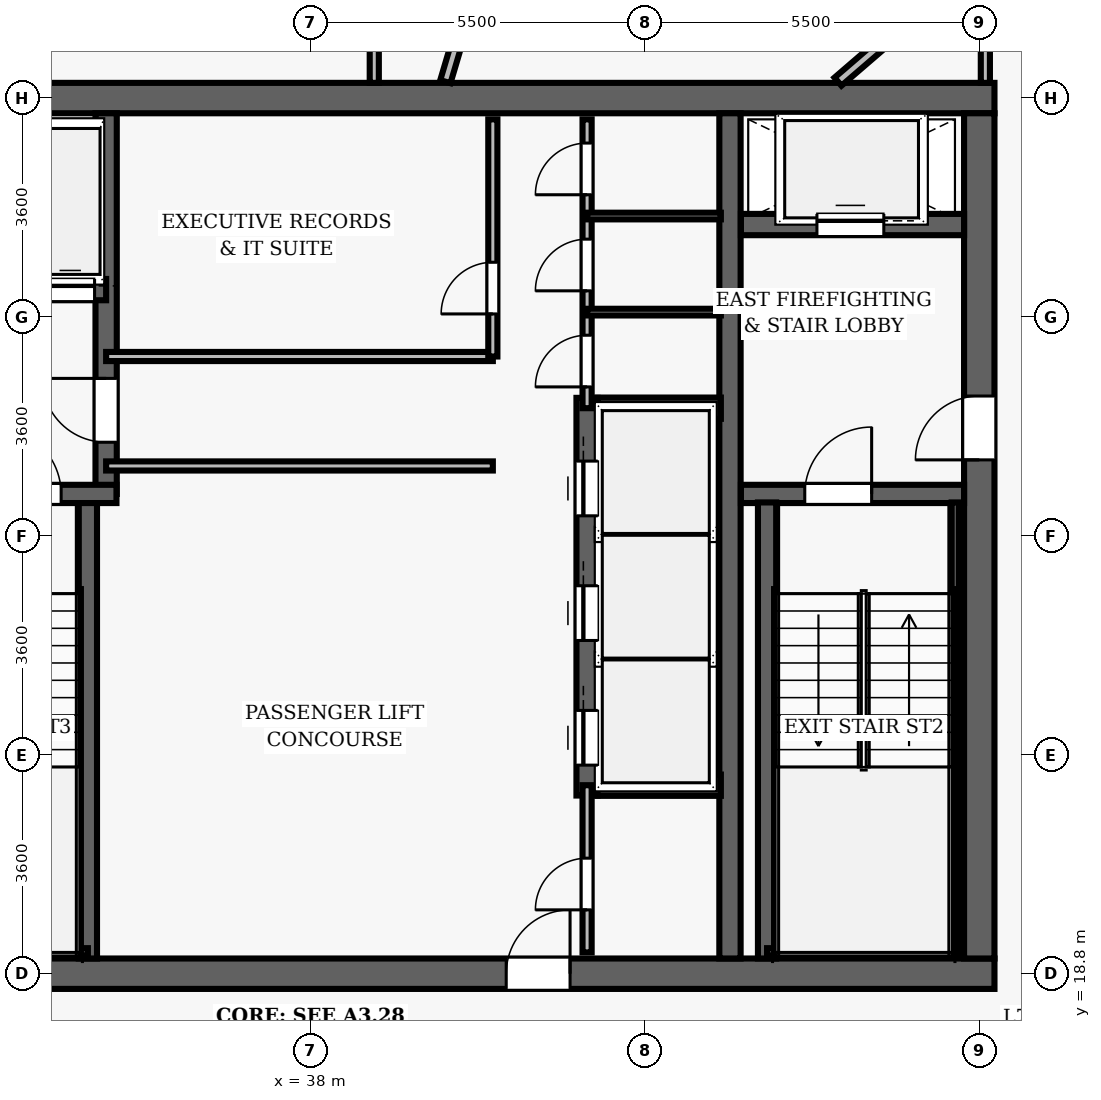
"""IFC4 building model, lengths in metres.
Left out: names, types, materials, properties, quantities, classifications, styles, units other than length and angle.
Written with IfcOpenShell. Run it as: python <this file> out.ifc"""

import sys

from ifc_helpers import new_model, si_unit, direction, frame, frame_2d, origin, place, context, subcontext, project, spatial, rectangle, extrude, element, fill, save


model = new_model("IFC4")
c1 = context("Model", 3, precision=1e-05, world=origin(), true_north=direction((0.0, 1.0)))
c2 = subcontext(c1, "Body", "Model", "MODEL_VIEW")
j1 = project(units=[si_unit("LENGTHUNIT", "METRE"), si_unit("PLANEANGLEUNIT", "RADIAN")], contexts=[c1])
p1 = place(None, origin())
s1 = spatial("IfcSite", under=j1, at=p1, CompositionType="ELEMENT")
p2 = place(p1, origin())
s2 = spatial("IfcBuilding", under=s1, at=p2, CompositionType="ELEMENT")
p3 = place(p2, frame((0.0, 0.0, 276.7)))
s3 = spatial("IfcBuildingStorey", under=s2, at=p3, CompositionType="ELEMENT", Elevation=276.7)
p4 = place(p3, frame((26.75, 18.8, 0.0), z_axis=(0.0, 0.0, 1.0), x_axis=(1.0, 0.0, 0.0)))
e1 = element("IfcWall", 1, at=p4, inside=s3, PredefinedType="SHEAR", context=c2, shape_type="SweptSolid", body=[
    extrude(rectangle(XDim=22.5, YDim=0.5, at=frame_2d((11.25, 0.0))), origin(), (0.0, 0.0, 1.0), 3.85),
])
p5 = place(p4, frame((14.47, 0.0, 0.0)))
e2 = element("IfcOpeningElement", 2, at=p5, cuts=e1, PredefinedType="OPENING", context=c2, shape_type="SweptSolid", body=[
    extrude(rectangle(XDim=1.05, YDim=2.15, at=frame_2d((0.525, 1.075))), frame((0.0, 0.26, 0.0), z_axis=(0.0, -1.0, 0.0), x_axis=(1.0, 0.0, 0.0)), (0.0, 0.0, 1.0), 0.52),
])
p6 = place(p3, frame((26.75, 33.2, 0.0), z_axis=(0.0, 0.0, 1.0), x_axis=(1.0, 0.0, 0.0)))
e3 = element("IfcWall", 3, at=p6, inside=s3, PredefinedType="SHEAR", context=c2, shape_type="SweptSolid", body=[
    extrude(rectangle(XDim=22.5, YDim=0.5, at=frame_2d((11.25, 0.0))), origin(), (0.0, 0.0, 1.0), 3.85),
])
p7 = place(p3, frame((49.0, 19.05, 0.0), z_axis=(0.0, 0.0, 1.0), x_axis=(0.0, 1.0, 0.0)))
e4 = element("IfcWall", 4, at=p7, inside=s3, PredefinedType="SHEAR", context=c2, shape_type="SweptSolid", body=[
    extrude(rectangle(XDim=13.9, YDim=0.5, at=frame_2d((6.95, 0.0))), origin(), (0.0, 0.0, 1.0), 3.85),
])
p8 = place(p7, frame((8.2, 0.0, 0.0)))
e5 = element("IfcOpeningElement", 5, at=p8, cuts=e4, PredefinedType="OPENING", context=c2, shape_type="SweptSolid", body=[
    extrude(rectangle(XDim=1.05, YDim=2.15, at=frame_2d((0.525, 1.075))), frame((0.0, 0.26, 0.0), z_axis=(0.0, -1.0, 0.0), x_axis=(1.0, 0.0, 0.0)), (0.0, 0.0, 1.0), 0.52),
])
p9 = place(p3, frame((44.9, 19.05, 0.0), z_axis=(0.0, 0.0, 1.0), x_axis=(0.0, 1.0, 0.0)))
e6 = element("IfcWall", 6, at=p9, inside=s3, PredefinedType="SHEAR", context=c2, shape_type="SweptSolid", body=[
    extrude(rectangle(XDim=13.9, YDim=0.35, at=frame_2d((6.95, 0.0))), origin(), (0.0, 0.0, 1.0), 3.85),
])
p10 = place(p3, frame((45.08, 26.69, 0.0), z_axis=(0.0, 0.0, 1.0), x_axis=(1.0, 0.0, 0.0)))
e7 = element("IfcWall", 7, at=p10, inside=s3, PredefinedType="SHEAR", context=c2, shape_type="SweptSolid", body=[
    extrude(rectangle(XDim=3.67, YDim=0.3, at=frame_2d((1.835, 0.0))), origin(), (0.0, 0.0, 1.0), 3.85),
])
p11 = place(p10, frame((1.05, 0.0, 0.0)))
e8 = element("IfcOpeningElement", 8, at=p11, cuts=e7, PredefinedType="OPENING", context=c2, shape_type="SweptSolid", body=[
    extrude(rectangle(XDim=1.1, YDim=2.15, at=frame_2d((0.55, 1.075))), frame((0.0, 0.16, 0.0), z_axis=(0.0, -1.0, 0.0), x_axis=(1.0, 0.0, 0.0)), (0.0, 0.0, 1.0), 0.32),
])
p12 = place(p3, frame((45.51, 19.05, 0.0), z_axis=(0.0, 0.0, 1.0), x_axis=(0.0, 1.0, 0.0)))
e9 = element("IfcWall", 9, at=p12, inside=s3, PredefinedType="SHEAR", context=c2, shape_type="SweptSolid", body=[
    extrude(rectangle(XDim=7.5, YDim=0.3, at=frame_2d((3.75, 0.0))), origin(), (0.0, 0.0, 1.0), 3.85),
])
p13 = place(p3, frame((48.605, 19.1, 0.0), z_axis=(0.0, 0.0, 1.0), x_axis=(0.0, 1.0, 0.0)))
e10 = element("IfcWall", 10, at=p13, inside=s3, PredefinedType="SHEAR", context=c2, shape_type="SweptSolid", body=[
    extrude(rectangle(XDim=7.45, YDim=0.12, at=frame_2d((3.725, 0.0))), origin(), (0.0, 0.0, 1.0), 3.85),
])
p14 = place(p3, frame((45.51, 19.16, 0.0), z_axis=(0.0, 0.0, 1.0), x_axis=(1.0, 0.0, 0.0)))
e11 = element("IfcWall", 11, at=p14, inside=s3, PredefinedType="SHEAR", context=c2, shape_type="SweptSolid", body=[
    extrude(rectangle(XDim=3.095, YDim=0.12, at=frame_2d((1.547, 0.0))), origin(), (0.0, 0.0, 1.0), 3.85),
])
p15 = place(p3, frame((45.08, 31.12, 0.0), z_axis=(0.0, 0.0, 1.0), x_axis=(1.0, 0.0, 0.0)))
e12 = element("IfcWall", 12, at=p15, inside=s3, PredefinedType="SHEAR", context=c2, shape_type="SweptSolid", body=[
    extrude(rectangle(XDim=3.67, YDim=0.35, at=frame_2d((1.835, 0.0))), origin(), (0.0, 0.0, 1.0), 3.04),
])
p16 = place(p15, frame((1.25, 0.0, 0.0)))
e13 = element("IfcOpeningElement", 13, at=p16, cuts=e12, PredefinedType="OPENING", context=c2, shape_type="SweptSolid", body=[
    extrude(rectangle(XDim=1.1, YDim=2.15, at=frame_2d((0.55, 1.075))), frame((0.0, 0.185, 0.0), z_axis=(0.0, -1.0, 0.0), x_axis=(1.0, 0.0, 0.0)), (0.0, 0.0, 1.0), 0.37),
])
p17 = place(p3, frame((34.34, 19.05, 0.0), z_axis=(0.0, 0.0, 1.0), x_axis=(0.0, 1.0, 0.0)))
e14 = element("IfcWall", 14, at=p17, inside=s3, PredefinedType="SHEAR", context=c2, shape_type="SweptSolid", body=[
    extrude(rectangle(XDim=7.5, YDim=0.3, at=frame_2d((3.75, 0.0))), origin(), (0.0, 0.0, 1.0), 3.85),
])
p18 = place(p3, frame((34.64, 26.69, 0.0), z_axis=(0.0, 0.0, 1.0), x_axis=(0.0, 1.0, 0.0)))
e15 = element("IfcWall", 15, at=p18, inside=s3, PredefinedType="SHEAR", context=c2, shape_type="SweptSolid", body=[
    extrude(rectangle(XDim=6.26, YDim=0.35, at=frame_2d((3.13, 0.0))), origin(), (0.0, 0.0, 1.0), 3.85),
])
p19 = place(p18, frame((0.85, 0.0, 0.0)))
e16 = element("IfcOpeningElement", 16, at=p19, cuts=e15, PredefinedType="OPENING", context=c2, shape_type="SweptSolid", body=[
    extrude(rectangle(XDim=1.05, YDim=2.15, at=frame_2d((0.525, 1.075))), frame((0.0, 0.185, 0.0), z_axis=(0.0, -1.0, 0.0), x_axis=(1.0, 0.0, 0.0)), (0.0, 0.0, 1.0), 0.37),
])
p20 = place(p3, frame((31.25, 26.69, 0.0), z_axis=(0.0, 0.0, 1.0), x_axis=(1.0, 0.0, 0.0)))
e17 = element("IfcWall", 17, at=p20, inside=s3, PredefinedType="SHEAR", context=c2, shape_type="SweptSolid", body=[
    extrude(rectangle(XDim=3.56, YDim=0.3, at=frame_2d((1.78, 0.0))), origin(), (0.0, 0.0, 1.0), 3.85),
])
p21 = place(p20, frame((1.55, 0.0, 0.0)))
e18 = element("IfcOpeningElement", 18, at=p21, cuts=e17, PredefinedType="OPENING", context=c2, shape_type="SweptSolid", body=[
    extrude(rectangle(XDim=1.1, YDim=2.15, at=frame_2d((0.55, 1.075))), frame((0.0, 0.16, 0.0), z_axis=(0.0, -1.0, 0.0), x_axis=(1.0, 0.0, 0.0)), (0.0, 0.0, 1.0), 0.32),
])
p22 = place(p3, frame((31.3, 19.16, 0.0), z_axis=(0.0, 0.0, 1.0), x_axis=(1.0, 0.0, 0.0)))
e19 = element("IfcWall", 19, at=p22, inside=s3, PredefinedType="SHEAR", context=c2, shape_type="SweptSolid", body=[
    extrude(rectangle(XDim=3.04, YDim=0.12, at=frame_2d((1.52, 0.0))), origin(), (0.0, 0.0, 1.0), 3.85),
])
p23 = place(p3, frame((32.23, 30.05, 0.0), z_axis=(0.0, 0.0, 1.0), x_axis=(1.0, 0.0, 0.0)))
e20 = element("IfcWall", 20, at=p23, inside=s3, PredefinedType="SHEAR", context=c2, shape_type="SweptSolid", body=[
    extrude(rectangle(XDim=2.41, YDim=0.35, at=frame_2d((1.205, 0.0))), origin(), (0.0, 0.0, 1.0), 3.04),
])
p24 = place(p23, frame((0.42, 0.0, 0.0)))
e21 = element("IfcOpeningElement", 21, at=p24, cuts=e20, PredefinedType="OPENING", context=c2, shape_type="SweptSolid", body=[
    extrude(rectangle(XDim=0.8, YDim=2.15, at=frame_2d((0.4, 1.075))), frame((0.0, 0.185, 0.0), z_axis=(0.0, -1.0, 0.0), x_axis=(1.0, 0.0, 0.0)), (0.0, 0.0, 1.0), 0.37),
])
p25 = place(p23, frame((1.42, 0.0, 0.0)))
e22 = element("IfcOpeningElement", 22, at=p25, cuts=e20, PredefinedType="OPENING", context=c2, shape_type="SweptSolid", body=[
    extrude(rectangle(XDim=0.8, YDim=2.15, at=frame_2d((0.4, 1.075))), frame((0.0, 0.185, 0.0), z_axis=(0.0, -1.0, 0.0), x_axis=(1.0, 0.0, 0.0)), (0.0, 0.0, 1.0), 0.37),
])
p26 = place(p3, frame((42.55, 21.73, 0.0), z_axis=(0.0, 0.0, 1.0), x_axis=(0.0, 1.0, 0.0)))
e23 = element("IfcWall", 23, at=p26, inside=s3, PredefinedType="SHEAR", context=c2, shape_type="SweptSolid", body=[
    extrude(rectangle(XDim=6.54, YDim=0.35, at=frame_2d((3.27, 0.0))), origin(), (0.0, 0.0, 1.0), 3.04),
])
p27 = place(p26, frame((0.5, 0.0, 0.0)))
e24 = element("IfcOpeningElement", 24, at=p27, cuts=e23, PredefinedType="OPENING", context=c2, shape_type="SweptSolid", body=[
    extrude(rectangle(XDim=0.9, YDim=2.15, at=frame_2d((0.45, 1.075))), frame((0.0, 0.185, 0.0), z_axis=(0.0, -1.0, 0.0), x_axis=(1.0, 0.0, 0.0)), (0.0, 0.0, 1.0), 0.37),
])
p28 = place(p26, frame((2.55, 0.0, 0.0)))
e25 = element("IfcOpeningElement", 25, at=p28, cuts=e23, PredefinedType="OPENING", context=c2, shape_type="SweptSolid", body=[
    extrude(rectangle(XDim=0.9, YDim=2.15, at=frame_2d((0.45, 1.075))), frame((0.0, 0.185, 0.0), z_axis=(0.0, -1.0, 0.0), x_axis=(1.0, 0.0, 0.0)), (0.0, 0.0, 1.0), 0.37),
])
p29 = place(p26, frame((4.6, 0.0, 0.0)))
e26 = element("IfcOpeningElement", 26, at=p29, cuts=e23, PredefinedType="OPENING", context=c2, shape_type="SweptSolid", body=[
    extrude(rectangle(XDim=0.9, YDim=2.15, at=frame_2d((0.45, 1.075))), frame((0.0, 0.185, 0.0), z_axis=(0.0, -1.0, 0.0), x_axis=(1.0, 0.0, 0.0)), (0.0, 0.0, 1.0), 0.37),
])
for number, where, z_axis, x_axis in (
    (27, (42.72, 21.9, 0.0), (0.0, 0.0, 1.0), (1.0, 0.0, 0.0)),
    (28, (42.72, 28.1, 0.0), (0.0, 0.0, 1.0), (1.0, 0.0, 0.0)),
):
    element("IfcWall", number, at=place(p3, frame(where, z_axis=z_axis, x_axis=x_axis)), inside=s3, PredefinedType="SHEAR", context=c2, shape_type="SweptSolid", body=[
        extrude(rectangle(XDim=2.03, YDim=0.35, at=frame_2d((1.015, 0.0))), origin(), (0.0, 0.0, 1.0), 3.04),
    ])
for number, where, z_axis, x_axis in (
    (29, (34.64, 27.15, 0.0), (0.0, 0.0, 1.0), (1.0, 0.0, 0.0)),
    (30, (34.64, 28.95, 0.0), (0.0, 0.0, 1.0), (1.0, 0.0, 0.0)),
):
    element("IfcWall", number, at=place(p3, frame(where, z_axis=z_axis, x_axis=x_axis)), inside=s3, PredefinedType="PARTITIONING", context=c2, shape_type="SweptSolid", body=[
        extrude(rectangle(XDim=6.36, YDim=0.15, at=frame_2d((3.18, 0.0))), origin(), (0.0, 0.0, 1.0), 3.04),
    ])
p30 = place(p3, frame((41.0, 28.95, 0.0), z_axis=(0.0, 0.0, 1.0), x_axis=(0.0, 1.0, 0.0)))
e31 = element("IfcWall", 31, at=p30, inside=s3, PredefinedType="PARTITIONING", context=c2, shape_type="SweptSolid", body=[
    extrude(rectangle(XDim=3.9, YDim=0.15, at=frame_2d((1.95, 0.0))), origin(), (0.0, 0.0, 1.0), 3.04),
])
p31 = place(p30, frame((0.7, 0.0, 0.0)))
e32 = element("IfcOpeningElement", 32, at=p31, cuts=e31, PredefinedType="OPENING", context=c2, shape_type="SweptSolid", body=[
    extrude(rectangle(XDim=0.85, YDim=2.1, at=frame_2d((0.425, 1.05))), frame((0.0, 0.085, 0.0), z_axis=(0.0, -1.0, 0.0), x_axis=(1.0, 0.0, 0.0)), (0.0, 0.0, 1.0), 0.17),
])
p32 = place(p3, frame((42.55, 28.1, 0.0), z_axis=(0.0, 0.0, 1.0), x_axis=(0.0, 1.0, 0.0)))
e33 = element("IfcWall", 33, at=p32, inside=s3, PredefinedType="PARTITIONING", context=c2, shape_type="SweptSolid", body=[
    extrude(rectangle(XDim=4.75, YDim=0.15, at=frame_2d((2.375, 0.0))), origin(), (0.0, 0.0, 1.0), 3.04),
])
p33 = place(p32, frame((0.35, 0.0, 0.0)))
e34 = element("IfcOpeningElement", 34, at=p33, cuts=e33, PredefinedType="OPENING", context=c2, shape_type="SweptSolid", body=[
    extrude(rectangle(XDim=0.85, YDim=2.1, at=frame_2d((0.425, 1.05))), frame((0.0, 0.085, 0.0), z_axis=(0.0, -1.0, 0.0), x_axis=(1.0, 0.0, 0.0)), (0.0, 0.0, 1.0), 0.17),
])
p34 = place(p32, frame((1.93, 0.0, 0.0)))
e35 = element("IfcOpeningElement", 35, at=p34, cuts=e33, PredefinedType="OPENING", context=c2, shape_type="SweptSolid", body=[
    extrude(rectangle(XDim=0.85, YDim=2.1, at=frame_2d((0.425, 1.05))), frame((0.0, 0.085, 0.0), z_axis=(0.0, -1.0, 0.0), x_axis=(1.0, 0.0, 0.0)), (0.0, 0.0, 1.0), 0.17),
])
p35 = place(p32, frame((3.51, 0.0, 0.0)))
e36 = element("IfcOpeningElement", 36, at=p35, cuts=e33, PredefinedType="OPENING", context=c2, shape_type="SweptSolid", body=[
    extrude(rectangle(XDim=0.85, YDim=2.1, at=frame_2d((0.425, 1.05))), frame((0.0, 0.085, 0.0), z_axis=(0.0, -1.0, 0.0), x_axis=(1.0, 0.0, 0.0)), (0.0, 0.0, 1.0), 0.17),
])
for number, where, z_axis, x_axis in (
    (37, (42.55, 29.68, 0.0), (0.0, 0.0, 1.0), (1.0, 0.0, 0.0)),
    (38, (42.55, 31.26, 0.0), (0.0, 0.0, 1.0), (1.0, 0.0, 0.0)),
):
    element("IfcWall", number, at=place(p3, frame(where, z_axis=z_axis, x_axis=x_axis)), inside=s3, PredefinedType="PARTITIONING", context=c2, shape_type="SweptSolid", body=[
        extrude(rectangle(XDim=2.2, YDim=0.11, at=frame_2d((1.1, 0.0))), origin(), (0.0, 0.0, 1.0), 3.04),
    ])
p36 = place(p3, frame((42.55, 19.15, 0.0), z_axis=(0.0, 0.0, 1.0), x_axis=(0.0, 1.0, 0.0)))
e39 = element("IfcWall", 39, at=p36, inside=s3, PredefinedType="PARTITIONING", context=c2, shape_type="SweptSolid", body=[
    extrude(rectangle(XDim=2.75, YDim=0.15, at=frame_2d((1.375, 0.0))), origin(), (0.0, 0.0, 1.0), 3.04),
])
p37 = place(p36, frame((0.7, 0.0, 0.0)))
e40 = element("IfcOpeningElement", 40, at=p37, cuts=e39, PredefinedType="OPENING", context=c2, shape_type="SweptSolid", body=[
    extrude(rectangle(XDim=0.85, YDim=2.1, at=frame_2d((0.425, 1.05))), frame((0.0, 0.085, 0.0), z_axis=(0.0, -1.0, 0.0), x_axis=(1.0, 0.0, 0.0)), (0.0, 0.0, 1.0), 0.17),
])
p38 = place(p3, frame((49.1, 33.45, 0.0), z_axis=(0.0, 0.0, 1.0), x_axis=(0.0, 1.0, 0.0)))
e41 = element("IfcWall", 41, at=p38, inside=s3, PredefinedType="PARTITIONING", context=c2, shape_type="SweptSolid", body=[
    extrude(rectangle(XDim=7.306, YDim=0.15, at=frame_2d((3.653, 0.0))), origin(), (0.0, 0.0, 1.0), 3.04),
])
p39 = place(p38, frame((2.615, 0.0, 0.0)))
e42 = element("IfcOpeningElement", 42, at=p39, cuts=e41, PredefinedType="OPENING", context=c2, shape_type="SweptSolid", body=[
    extrude(rectangle(XDim=0.95, YDim=2.15, at=frame_2d((0.475, 1.075))), frame((0.0, 0.085, 0.0), z_axis=(0.0, -1.0, 0.0), x_axis=(1.0, 0.0, 0.0)), (0.0, 0.0, 1.0), 0.17),
])
p40 = place(p3, frame((39.05, 33.45, 0.0), z_axis=(0.0, 0.0, 1.0), x_axis=(0.0, 1.0, 0.0)))
e43 = element("IfcWall", 43, at=p40, inside=s3, PredefinedType="PARTITIONING", context=c2, shape_type="SweptSolid", body=[
    extrude(rectangle(XDim=6.95, YDim=0.15, at=frame_2d((3.475, 0.0))), origin(), (0.0, 0.0, 1.0), 3.04),
])
p41 = place(p40, frame((1.262, 0.0, 0.0)))
e44 = element("IfcOpeningElement", 44, at=p41, cuts=e43, PredefinedType="OPENING", context=c2, shape_type="SweptSolid", body=[
    extrude(rectangle(XDim=0.95, YDim=2.15, at=frame_2d((0.475, 1.075))), frame((0.0, 0.085, 0.0), z_axis=(0.0, -1.0, 0.0), x_axis=(1.0, 0.0, 0.0)), (0.0, 0.0, 1.0), 0.17),
])
p42 = place(p3, frame((46.676, 33.47, 0.0), z_axis=(0.0, 0.0, 1.0), x_axis=(0.757802183171, 0.652484368534, 0.0)))
e45 = element("IfcWall", 45, at=p42, inside=s3, PredefinedType="PARTITIONING", context=c2, shape_type="SweptSolid", body=[
    extrude(rectangle(XDim=3.014, YDim=0.175, at=frame_2d((1.507, 0.0))), origin(), (0.0, 0.0, 1.0), 3.04),
])
p43 = place(p3, frame((40.219, 33.47, 0.0), z_axis=(0.0, 0.0, 1.0), x_axis=(0.284761265489, 0.958598467387, 0.0)))
e46 = element("IfcWall", 46, at=p43, inside=s3, PredefinedType="PARTITIONING", context=c2, shape_type="SweptSolid", body=[
    extrude(rectangle(XDim=13.315, YDim=0.175, at=frame_2d((6.657, 0.0))), origin(), (0.0, 0.0, 1.0), 3.04),
])
p44 = place(p11, origin())
e47 = element("IfcDoor", 47, at=p44, inside=s3, OperationType="SINGLE_SWING_RIGHT", PredefinedType="DOOR", context=c2, shape_type="SweptSolid", body=[
    extrude(rectangle(XDim=1.1, YDim=2.15, at=frame_2d((0.55, 1.075))), frame((0.0, 0.025, 0.0), z_axis=(0.0, -1.0, 0.0), x_axis=(1.0, 0.0, 0.0)), (0.0, 0.0, 1.0), 0.05),
])
fill(e8, e47)
p45 = place(p8, origin())
e48 = element("IfcDoor", 48, at=p45, inside=s3, OperationType="SINGLE_SWING_LEFT", PredefinedType="DOOR", context=c2, shape_type="SweptSolid", body=[
    extrude(rectangle(XDim=1.05, YDim=2.15, at=frame_2d((0.525, 1.075))), frame((0.0, 0.025, 0.0), z_axis=(0.0, -1.0, 0.0), x_axis=(1.0, 0.0, 0.0)), (0.0, 0.0, 1.0), 0.05),
])
fill(e5, e48)
p46 = place(p21, origin())
e49 = element("IfcDoor", 49, at=p46, inside=s3, OperationType="SINGLE_SWING_LEFT", PredefinedType="DOOR", context=c2, shape_type="SweptSolid", body=[
    extrude(rectangle(XDim=1.1, YDim=2.15, at=frame_2d((0.55, 1.075))), frame((0.0, 0.025, 0.0), z_axis=(0.0, -1.0, 0.0), x_axis=(1.0, 0.0, 0.0)), (0.0, 0.0, 1.0), 0.05),
])
fill(e18, e49)
p47 = place(p5, origin())
e50 = element("IfcDoor", 50, at=p47, inside=s3, OperationType="SINGLE_SWING_RIGHT", PredefinedType="DOOR", context=c2, shape_type="SweptSolid", body=[
    extrude(rectangle(XDim=1.05, YDim=2.15, at=frame_2d((0.525, 1.075))), frame((0.0, 0.025, 0.0), z_axis=(0.0, -1.0, 0.0), x_axis=(1.0, 0.0, 0.0)), (0.0, 0.0, 1.0), 0.05),
])
fill(e2, e50)
p48 = place(p19, origin())
e51 = element("IfcDoor", 51, at=p48, inside=s3, OperationType="SINGLE_SWING_RIGHT", PredefinedType="DOOR", context=c2, shape_type="SweptSolid", body=[
    extrude(rectangle(XDim=1.05, YDim=2.15, at=frame_2d((0.525, 1.075))), frame((0.0, 0.025, 0.0), z_axis=(0.0, -1.0, 0.0), x_axis=(1.0, 0.0, 0.0)), (0.0, 0.0, 1.0), 0.05),
])
fill(e16, e51)
p49 = place(p31, origin())
e52 = element("IfcDoor", 52, at=p49, inside=s3, OperationType="SINGLE_SWING_LEFT", PredefinedType="DOOR", context=c2, shape_type="SweptSolid", body=[
    extrude(rectangle(XDim=0.85, YDim=2.1, at=frame_2d((0.425, 1.05))), frame((0.0, 0.025, 0.0), z_axis=(0.0, -1.0, 0.0), x_axis=(1.0, 0.0, 0.0)), (0.0, 0.0, 1.0), 0.05),
])
fill(e32, e52)
p50 = place(p33, origin())
e53 = element("IfcDoor", 53, at=p50, inside=s3, OperationType="SINGLE_SWING_LEFT", PredefinedType="DOOR", context=c2, shape_type="SweptSolid", body=[
    extrude(rectangle(XDim=0.85, YDim=2.1, at=frame_2d((0.425, 1.05))), frame((0.0, 0.025, 0.0), z_axis=(0.0, -1.0, 0.0), x_axis=(1.0, 0.0, 0.0)), (0.0, 0.0, 1.0), 0.05),
])
fill(e34, e53)
p51 = place(p34, origin())
e54 = element("IfcDoor", 54, at=p51, inside=s3, OperationType="SINGLE_SWING_LEFT", PredefinedType="DOOR", context=c2, shape_type="SweptSolid", body=[
    extrude(rectangle(XDim=0.85, YDim=2.1, at=frame_2d((0.425, 1.05))), frame((0.0, 0.025, 0.0), z_axis=(0.0, -1.0, 0.0), x_axis=(1.0, 0.0, 0.0)), (0.0, 0.0, 1.0), 0.05),
])
fill(e35, e54)
p52 = place(p35, origin())
e55 = element("IfcDoor", 55, at=p52, inside=s3, OperationType="SINGLE_SWING_LEFT", PredefinedType="DOOR", context=c2, shape_type="SweptSolid", body=[
    extrude(rectangle(XDim=0.85, YDim=2.1, at=frame_2d((0.425, 1.05))), frame((0.0, 0.025, 0.0), z_axis=(0.0, -1.0, 0.0), x_axis=(1.0, 0.0, 0.0)), (0.0, 0.0, 1.0), 0.05),
])
fill(e36, e55)
p53 = place(p37, origin())
e56 = element("IfcDoor", 56, at=p53, inside=s3, OperationType="SINGLE_SWING_LEFT", PredefinedType="DOOR", context=c2, shape_type="SweptSolid", body=[
    extrude(rectangle(XDim=0.85, YDim=2.1, at=frame_2d((0.425, 1.05))), frame((0.0, 0.025, 0.0), z_axis=(0.0, -1.0, 0.0), x_axis=(1.0, 0.0, 0.0)), (0.0, 0.0, 1.0), 0.05),
])
fill(e40, e56)
p54 = place(p27, origin())
e57 = element("IfcDoor", 57, at=p54, inside=s3, OperationType="SLIDING_TO_LEFT", PredefinedType="DOOR", context=c2, shape_type="SweptSolid", body=[
    extrude(rectangle(XDim=0.9, YDim=2.15, at=frame_2d((0.45, 1.075))), frame((0.0, 0.025, 0.0), z_axis=(0.0, -1.0, 0.0), x_axis=(1.0, 0.0, 0.0)), (0.0, 0.0, 1.0), 0.05),
])
fill(e24, e57)
p55 = place(p28, origin())
e58 = element("IfcDoor", 58, at=p55, inside=s3, OperationType="SLIDING_TO_LEFT", PredefinedType="DOOR", context=c2, shape_type="SweptSolid", body=[
    extrude(rectangle(XDim=0.9, YDim=2.15, at=frame_2d((0.45, 1.075))), frame((0.0, 0.025, 0.0), z_axis=(0.0, -1.0, 0.0), x_axis=(1.0, 0.0, 0.0)), (0.0, 0.0, 1.0), 0.05),
])
fill(e25, e58)
p56 = place(p29, origin())
e59 = element("IfcDoor", 59, at=p56, inside=s3, OperationType="SLIDING_TO_LEFT", PredefinedType="DOOR", context=c2, shape_type="SweptSolid", body=[
    extrude(rectangle(XDim=0.9, YDim=2.15, at=frame_2d((0.45, 1.075))), frame((0.0, 0.025, 0.0), z_axis=(0.0, -1.0, 0.0), x_axis=(1.0, 0.0, 0.0)), (0.0, 0.0, 1.0), 0.05),
])
fill(e26, e59)
p57 = place(p16, origin())
e60 = element("IfcDoor", 60, at=p57, inside=s3, OperationType="SLIDING_TO_LEFT", PredefinedType="DOOR", context=c2, shape_type="SweptSolid", body=[
    extrude(rectangle(XDim=1.1, YDim=2.15, at=frame_2d((0.55, 1.075))), frame((0.0, 0.025, 0.0), z_axis=(0.0, -1.0, 0.0), x_axis=(1.0, 0.0, 0.0)), (0.0, 0.0, 1.0), 0.05),
])
fill(e13, e60)
p58 = place(p25, origin())
e61 = element("IfcDoor", 61, at=p58, inside=s3, OperationType="SLIDING_TO_LEFT", PredefinedType="DOOR", context=c2, shape_type="SweptSolid", body=[
    extrude(rectangle(XDim=0.8, YDim=2.15, at=frame_2d((0.4, 1.075))), frame((0.0, 0.025, 0.0), z_axis=(0.0, -1.0, 0.0), x_axis=(1.0, 0.0, 0.0)), (0.0, 0.0, 1.0), 0.05),
])
fill(e22, e61)
save(model, sys.argv[1])
